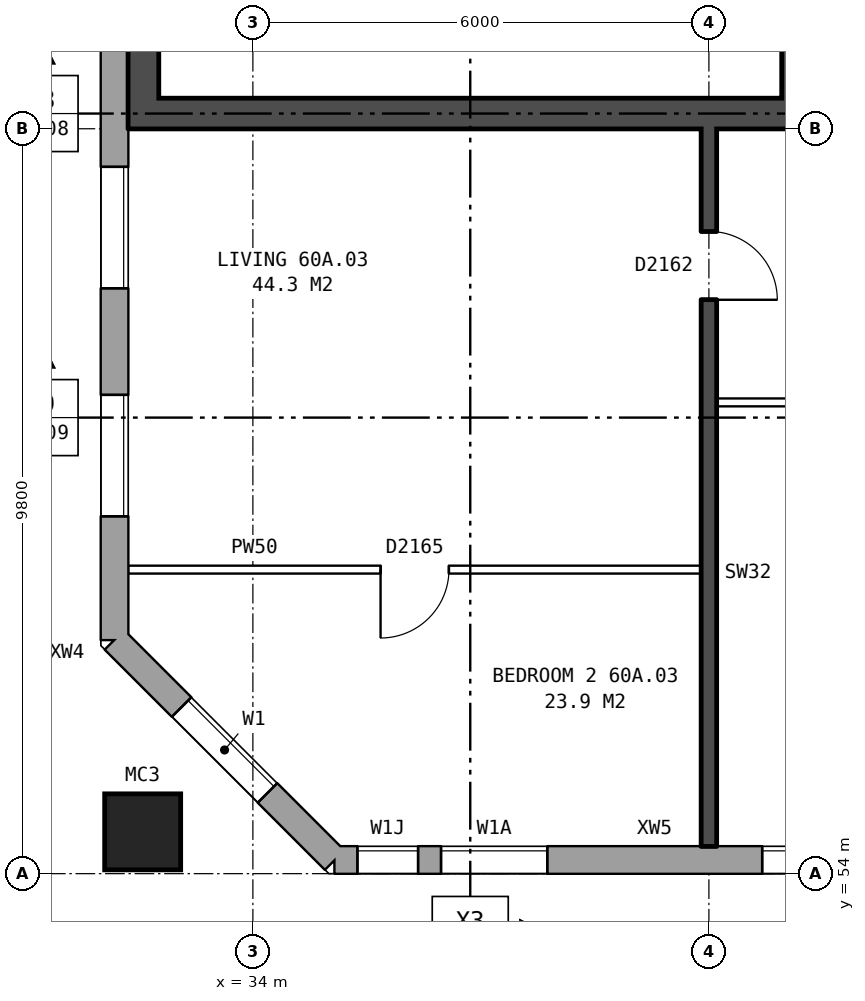
"""IFC4 building model, lengths in metres.
Left out: names, types, materials, properties, quantities, classifications, styles, units other than length and angle.
Written with IfcOpenShell. Run it as: python <this file> out.ifc"""

import sys

from ifc_helpers import new_model, si_unit, direction, frame, frame_2d, origin, origin_2d, place, context, subcontext, project, spatial, rectangle, hollow_rectangle, extrude, element, fill, save


model = new_model("IFC4")
c1 = context("Model", 3, precision=1e-05, world=origin(), true_north=direction((0.0, 1.0)))
c2 = subcontext(c1, "Body", "Model", "MODEL_VIEW")
j1 = project(units=[si_unit("LENGTHUNIT", "METRE"), si_unit("PLANEANGLEUNIT", "RADIAN")], contexts=[c1])
p1 = place(None, origin())
s1 = spatial("IfcSite", under=j1, at=p1, CompositionType="ELEMENT")
p2 = place(p1, origin())
s2 = spatial("IfcBuilding", under=s1, at=p2, CompositionType="ELEMENT")
p3 = place(p2, frame((0.0, 0.0, 212.1)))
s3 = spatial("IfcBuildingStorey", under=s2, at=p3, CompositionType="ELEMENT", Elevation=212.1)
p4 = place(p3, frame((32.55, 54.55, 0.0), z_axis=(0.0, 0.0, 1.0), x_axis=(1.0, 0.0, 0.0)))
e1 = element("IfcColumn", 1, at=p4, inside=s3, PredefinedType="COLUMN", context=c2, shape_type="SweptSolid", body=[
    extrude(hollow_rectangle(XDim=1.0, YDim=1.0, WallThickness=0.055, at=origin_2d()), origin(), (0.0, 0.0, 1.0), 3.1),
])
p5 = place(p3, frame((32.18, 57.075, 0.0), z_axis=(0.0, 0.0, 1.0), x_axis=(0.707106781187, -0.707106781187, 0.0)))
e2 = element("IfcWall", 2, at=p5, inside=s3, PredefinedType="STANDARD", context=c2, shape_type="SweptSolid", body=[
    extrude(rectangle(XDim=4.094, YDim=0.36, at=frame_2d((2.047, 0.0))), origin(), (0.0, 0.0, 1.0), 2.85),
])
p6 = place(p5, frame((1.247, 0.0, 0.8)))
e3 = element("IfcOpeningElement", 3, at=p6, cuts=e2, PredefinedType="OPENING", context=c2, shape_type="SweptSolid", body=[
    extrude(rectangle(XDim=1.6, YDim=1.8, at=frame_2d((0.8, 0.9))), frame((0.0, 0.19, 0.0), z_axis=(0.0, -1.0, 0.0), x_axis=(1.0, 0.0, 0.0)), (0.0, 0.0, 1.0), 0.38),
])
p7 = place(p3, frame((35.075, 54.18, 0.0), z_axis=(0.0, 0.0, 1.0), x_axis=(1.0, 0.0, 0.0)))
e4 = element("IfcWall", 4, at=p7, inside=s3, PredefinedType="STANDARD", context=c2, shape_type="SweptSolid", body=[
    extrude(rectangle(XDim=39.875, YDim=0.36, at=frame_2d((19.938, 0.0))), origin(), (0.0, 0.0, 1.0), 2.85),
])
p8 = place(p7, frame((0.3, 0.0, 0.8)))
e5 = element("IfcOpeningElement", 5, at=p8, cuts=e4, PredefinedType="OPENING", context=c2, shape_type="SweptSolid", body=[
    extrude(rectangle(XDim=0.8, YDim=1.5, at=frame_2d((0.4, 0.75))), frame((0.0, 0.19, 0.0), z_axis=(0.0, -1.0, 0.0), x_axis=(1.0, 0.0, 0.0)), (0.0, 0.0, 1.0), 0.38),
])
p9 = place(p7, frame((5.625, 0.0, 0.8)))
e6 = element("IfcOpeningElement", 6, at=p9, cuts=e4, PredefinedType="OPENING", context=c2, shape_type="SweptSolid", body=[
    extrude(rectangle(XDim=1.6, YDim=1.8, at=frame_2d((0.8, 0.9))), frame((0.0, 0.19, 0.0), z_axis=(0.0, -1.0, 0.0), x_axis=(1.0, 0.0, 0.0)), (0.0, 0.0, 1.0), 0.38),
])
p10 = place(p7, frame((8.625, 0.0, 0.8)))
e7 = element("IfcOpeningElement", 7, at=p10, cuts=e4, PredefinedType="OPENING", context=c2, shape_type="SweptSolid", body=[
    extrude(rectangle(XDim=1.6, YDim=1.8, at=frame_2d((0.8, 0.9))), frame((0.0, 0.19, 0.0), z_axis=(0.0, -1.0, 0.0), x_axis=(1.0, 0.0, 0.0)), (0.0, 0.0, 1.0), 0.38),
])
p11 = place(p7, frame((11.625, 0.0, 0.8)))
e8 = element("IfcOpeningElement", 8, at=p11, cuts=e4, PredefinedType="OPENING", context=c2, shape_type="SweptSolid", body=[
    extrude(rectangle(XDim=1.6, YDim=1.8, at=frame_2d((0.8, 0.9))), frame((0.0, 0.19, 0.0), z_axis=(0.0, -1.0, 0.0), x_axis=(1.0, 0.0, 0.0)), (0.0, 0.0, 1.0), 0.38),
])
p12 = place(p7, frame((14.625, 0.0, 0.8)))
e9 = element("IfcOpeningElement", 9, at=p12, cuts=e4, PredefinedType="OPENING", context=c2, shape_type="SweptSolid", body=[
    extrude(rectangle(XDim=1.6, YDim=1.8, at=frame_2d((0.8, 0.9))), frame((0.0, 0.19, 0.0), z_axis=(0.0, -1.0, 0.0), x_axis=(1.0, 0.0, 0.0)), (0.0, 0.0, 1.0), 0.38),
])
p13 = place(p7, frame((17.625, 0.0, 0.8)))
e10 = element("IfcOpeningElement", 10, at=p13, cuts=e4, PredefinedType="OPENING", context=c2, shape_type="SweptSolid", body=[
    extrude(rectangle(XDim=1.6, YDim=1.8, at=frame_2d((0.8, 0.9))), frame((0.0, 0.19, 0.0), z_axis=(0.0, -1.0, 0.0), x_axis=(1.0, 0.0, 0.0)), (0.0, 0.0, 1.0), 0.38),
])
p14 = place(p7, frame((20.625, 0.0, 0.8)))
e11 = element("IfcOpeningElement", 11, at=p14, cuts=e4, PredefinedType="OPENING", context=c2, shape_type="SweptSolid", body=[
    extrude(rectangle(XDim=1.6, YDim=1.8, at=frame_2d((0.8, 0.9))), frame((0.0, 0.19, 0.0), z_axis=(0.0, -1.0, 0.0), x_axis=(1.0, 0.0, 0.0)), (0.0, 0.0, 1.0), 0.38),
])
p15 = place(p7, frame((23.625, 0.0, 0.8)))
e12 = element("IfcOpeningElement", 12, at=p15, cuts=e4, PredefinedType="OPENING", context=c2, shape_type="SweptSolid", body=[
    extrude(rectangle(XDim=1.6, YDim=1.8, at=frame_2d((0.8, 0.9))), frame((0.0, 0.19, 0.0), z_axis=(0.0, -1.0, 0.0), x_axis=(1.0, 0.0, 0.0)), (0.0, 0.0, 1.0), 0.38),
])
p16 = place(p7, frame((26.625, 0.0, 0.8)))
e13 = element("IfcOpeningElement", 13, at=p16, cuts=e4, PredefinedType="OPENING", context=c2, shape_type="SweptSolid", body=[
    extrude(rectangle(XDim=1.6, YDim=1.8, at=frame_2d((0.8, 0.9))), frame((0.0, 0.19, 0.0), z_axis=(0.0, -1.0, 0.0), x_axis=(1.0, 0.0, 0.0)), (0.0, 0.0, 1.0), 0.38),
])
p17 = place(p7, frame((29.625, 0.0, 0.8)))
e14 = element("IfcOpeningElement", 14, at=p17, cuts=e4, PredefinedType="OPENING", context=c2, shape_type="SweptSolid", body=[
    extrude(rectangle(XDim=1.6, YDim=1.8, at=frame_2d((0.8, 0.9))), frame((0.0, 0.19, 0.0), z_axis=(0.0, -1.0, 0.0), x_axis=(1.0, 0.0, 0.0)), (0.0, 0.0, 1.0), 0.38),
])
p18 = place(p7, frame((31.525, 0.0, 0.8)))
e15 = element("IfcOpeningElement", 15, at=p18, cuts=e4, PredefinedType="OPENING", context=c2, shape_type="SweptSolid", body=[
    extrude(rectangle(XDim=0.8, YDim=1.5, at=frame_2d((0.4, 0.75))), frame((0.0, 0.19, 0.0), z_axis=(0.0, -1.0, 0.0), x_axis=(1.0, 0.0, 0.0)), (0.0, 0.0, 1.0), 0.38),
])
p19 = place(p7, frame((35.625, 0.0, 0.8)))
e16 = element("IfcOpeningElement", 16, at=p19, cuts=e4, PredefinedType="OPENING", context=c2, shape_type="SweptSolid", body=[
    extrude(rectangle(XDim=1.6, YDim=1.8, at=frame_2d((0.8, 0.9))), frame((0.0, 0.19, 0.0), z_axis=(0.0, -1.0, 0.0), x_axis=(1.0, 0.0, 0.0)), (0.0, 0.0, 1.0), 0.38),
])
p20 = place(p7, frame((1.4, 0.0, 0.8)))
e17 = element("IfcOpeningElement", 17, at=p20, cuts=e4, PredefinedType="OPENING", context=c2, shape_type="SweptSolid", body=[
    extrude(rectangle(XDim=1.4, YDim=1.8, at=frame_2d((0.7, 0.9))), frame((0.0, 0.19, 0.0), z_axis=(0.0, -1.0, 0.0), x_axis=(1.0, 0.0, 0.0)), (0.0, 0.0, 1.0), 0.38),
])
p21 = place(p7, frame((33.975, 0.0, 1.7)))
e18 = element("IfcOpeningElement", 18, at=p21, cuts=e4, PredefinedType="OPENING", context=c2, shape_type="SweptSolid", body=[
    extrude(rectangle(XDim=0.6, YDim=0.9, at=frame_2d((0.3, 0.45))), frame((0.0, 0.19, 0.0), z_axis=(0.0, -1.0, 0.0), x_axis=(1.0, 0.0, 0.0)), (0.0, 0.0, 1.0), 0.38),
])
p22 = place(p3, frame((32.18, 82.925, 0.0), z_axis=(0.0, 0.0, 1.0), x_axis=(0.0, -1.0, 0.0)))
e19 = element("IfcWall", 19, at=p22, inside=s3, PredefinedType="STANDARD", context=c2, shape_type="SweptSolid", body=[
    extrude(rectangle(XDim=25.851, YDim=0.36, at=frame_2d((12.925, 0.0))), origin(), (0.0, 0.0, 1.0), 2.85),
])
p23 = place(p22, frame((1.625, 0.0, 0.8)))
e20 = element("IfcOpeningElement", 20, at=p23, cuts=e19, PredefinedType="OPENING", context=c2, shape_type="SweptSolid", body=[
    extrude(rectangle(XDim=1.6, YDim=1.8, at=frame_2d((0.8, 0.9))), frame((0.0, 0.19, 0.0), z_axis=(0.0, -1.0, 0.0), x_axis=(1.0, 0.0, 0.0)), (0.0, 0.0, 1.0), 0.38),
])
p24 = place(p22, frame((4.625, 0.0, 0.8)))
e21 = element("IfcOpeningElement", 21, at=p24, cuts=e19, PredefinedType="OPENING", context=c2, shape_type="SweptSolid", body=[
    extrude(rectangle(XDim=1.6, YDim=1.8, at=frame_2d((0.8, 0.9))), frame((0.0, 0.19, 0.0), z_axis=(0.0, -1.0, 0.0), x_axis=(1.0, 0.0, 0.0)), (0.0, 0.0, 1.0), 0.38),
])
p25 = place(p22, frame((19.625, 0.0, 0.8)))
e22 = element("IfcOpeningElement", 22, at=p25, cuts=e19, PredefinedType="OPENING", context=c2, shape_type="SweptSolid", body=[
    extrude(rectangle(XDim=1.6, YDim=1.8, at=frame_2d((0.8, 0.9))), frame((0.0, 0.19, 0.0), z_axis=(0.0, -1.0, 0.0), x_axis=(1.0, 0.0, 0.0)), (0.0, 0.0, 1.0), 0.38),
])
p26 = place(p22, frame((22.625, 0.0, 0.8)))
e23 = element("IfcOpeningElement", 23, at=p26, cuts=e19, PredefinedType="OPENING", context=c2, shape_type="SweptSolid", body=[
    extrude(rectangle(XDim=1.6, YDim=1.8, at=frame_2d((0.8, 0.9))), frame((0.0, 0.19, 0.0), z_axis=(0.0, -1.0, 0.0), x_axis=(1.0, 0.0, 0.0)), (0.0, 0.0, 1.0), 0.38),
])
p27 = place(p3, frame((41.16, 76.2, 0.0), z_axis=(0.0, 0.0, 1.0), x_axis=(0.0, -1.0, 0.0)))
e24 = element("IfcWall", 24, at=p27, inside=s3, PredefinedType="SHEAR", context=c2, shape_type="SweptSolid", body=[
    extrude(rectangle(XDim=12.4, YDim=0.4, at=frame_2d((6.2, 0.0))), origin(), (0.0, 0.0, 1.0), 2.85),
])
p28 = place(p27, frame((1.325, 0.0, 0.0)))
e25 = element("IfcOpeningElement", 25, at=p28, cuts=e24, PredefinedType="OPENING", context=c2, shape_type="SweptSolid", body=[
    extrude(rectangle(XDim=1.1, YDim=2.1, at=frame_2d((0.55, 1.05))), frame((0.0, 0.21, 0.0), z_axis=(0.0, -1.0, 0.0), x_axis=(1.0, 0.0, 0.0)), (0.0, 0.0, 1.0), 0.42),
])
p29 = place(p27, frame((4.575, 0.0, 0.0)))
e26 = element("IfcOpeningElement", 26, at=p29, cuts=e24, PredefinedType="OPENING", context=c2, shape_type="SweptSolid", body=[
    extrude(rectangle(XDim=0.85, YDim=2.1, at=frame_2d((0.425, 1.05))), frame((0.0, 0.21, 0.0), z_axis=(0.0, -1.0, 0.0), x_axis=(1.0, 0.0, 0.0)), (0.0, 0.0, 1.0), 0.42),
])
p30 = place(p27, frame((7.825, 0.0, 0.0)))
e27 = element("IfcOpeningElement", 27, at=p30, cuts=e24, PredefinedType="OPENING", context=c2, shape_type="SweptSolid", body=[
    extrude(rectangle(XDim=0.85, YDim=2.1, at=frame_2d((0.425, 1.05))), frame((0.0, 0.21, 0.0), z_axis=(0.0, -1.0, 0.0), x_axis=(1.0, 0.0, 0.0)), (0.0, 0.0, 1.0), 0.42),
])
p31 = place(p27, frame((9.9, 0.0, 0.0)))
e28 = element("IfcOpeningElement", 28, at=p31, cuts=e24, PredefinedType="OPENING", context=c2, shape_type="SweptSolid", body=[
    extrude(rectangle(XDim=1.1, YDim=2.1, at=frame_2d((0.55, 1.05))), frame((0.0, 0.21, 0.0), z_axis=(0.0, -1.0, 0.0), x_axis=(1.0, 0.0, 0.0)), (0.0, 0.0, 1.0), 0.42),
])
p32 = place(p3, frame((32.56, 76.2, 0.0), z_axis=(0.0, 0.0, 1.0), x_axis=(0.0, -1.0, 0.0)))
e29 = element("IfcWall", 29, at=p32, inside=s3, PredefinedType="SHEAR", context=c2, shape_type="SweptSolid", body=[
    extrude(rectangle(XDim=12.4, YDim=0.4, at=frame_2d((6.2, 0.0))), origin(), (0.0, 0.0, 1.0), 2.85),
])
p33 = place(p3, frame((40.96, 64.0, 0.0), z_axis=(0.0, 0.0, 1.0), x_axis=(-1.0, 0.0, 0.0)))
e30 = element("IfcWall", 30, at=p33, inside=s3, PredefinedType="SHEAR", context=c2, shape_type="SweptSolid", body=[
    extrude(rectangle(XDim=8.2, YDim=0.4, at=frame_2d((4.1, 0.0))), origin(), (0.0, 0.0, 1.0), 2.85),
])
p34 = place(p3, frame((32.36, 58.0, 0.0), z_axis=(0.0, 0.0, 1.0), x_axis=(1.0, 0.0, 0.0)))
e31 = element("IfcWall", 31, at=p34, inside=s3, PredefinedType="PARTITIONING", context=c2, shape_type="SweptSolid", body=[
    extrude(rectangle(XDim=7.54, YDim=0.1, at=frame_2d((3.77, 0.0))), origin(), (0.0, 0.0, 1.0), 2.85),
])
p35 = place(p34, frame((3.32, 0.0, 0.0)))
e32 = element("IfcOpeningElement", 32, at=p35, cuts=e31, PredefinedType="OPENING", context=c2, shape_type="SweptSolid", body=[
    extrude(rectangle(XDim=0.9, YDim=2.1, at=frame_2d((0.45, 1.05))), frame((0.0, 0.06, 0.0), z_axis=(0.0, -1.0, 0.0), x_axis=(1.0, 0.0, 0.0)), (0.0, 0.0, 1.0), 0.12),
])
p36 = place(p3, frame((40.1, 60.2, 0.0), z_axis=(0.0, 0.0, 1.0), x_axis=(1.0, 0.0, 0.0)))
e33 = element("IfcWall", 33, at=p36, inside=s3, PredefinedType="PARTITIONING", context=c2, shape_type="SweptSolid", body=[
    extrude(rectangle(XDim=5.8, YDim=0.1, at=frame_2d((2.9, 0.0))), origin(), (0.0, 0.0, 1.0), 2.85),
])
p37 = place(p36, frame((1.3, 0.0, 0.0)))
e34 = element("IfcOpeningElement", 34, at=p37, cuts=e33, PredefinedType="OPENING", context=c2, shape_type="SweptSolid", body=[
    extrude(rectangle(XDim=0.9, YDim=2.1, at=frame_2d((0.45, 1.05))), frame((0.0, 0.06, 0.0), z_axis=(0.0, -1.0, 0.0), x_axis=(1.0, 0.0, 0.0)), (0.0, 0.0, 1.0), 0.12),
])
p38 = place(p36, frame((4.2, 0.0, 0.0)))
e35 = element("IfcOpeningElement", 35, at=p38, cuts=e33, PredefinedType="OPENING", context=c2, shape_type="SweptSolid", body=[
    extrude(rectangle(XDim=0.9, YDim=2.1, at=frame_2d((0.45, 1.05))), frame((0.0, 0.06, 0.0), z_axis=(0.0, -1.0, 0.0), x_axis=(1.0, 0.0, 0.0)), (0.0, 0.0, 1.0), 0.12),
])
p39 = place(p3, frame((40.0, 54.36, 0.0), z_axis=(0.0, 0.0, 1.0), x_axis=(0.0, 1.0, 0.0)))
e36 = element("IfcWall", 36, at=p39, inside=s3, PredefinedType="SOLIDWALL", context=c2, shape_type="SweptSolid", body=[
    extrude(rectangle(XDim=9.44, YDim=0.2, at=frame_2d((4.72, 0.0))), origin(), (0.0, 0.0, 1.0), 2.85),
])
p40 = place(p39, frame((7.19, 0.0, 0.0)))
e37 = element("IfcOpeningElement", 37, at=p40, cuts=e36, PredefinedType="OPENING", context=c2, shape_type="SweptSolid", body=[
    extrude(rectangle(XDim=0.9, YDim=2.1, at=frame_2d((0.45, 1.05))), frame((0.0, 0.11, 0.0), z_axis=(0.0, -1.0, 0.0), x_axis=(1.0, 0.0, 0.0)), (0.0, 0.0, 1.0), 0.22),
])
p41 = place(p6, origin())
e38 = element("IfcWindow", 38, at=p41, inside=s3, PartitioningType="SINGLE_PANEL", PredefinedType="WINDOW", context=c2, shape_type="SweptSolid", body=[
    extrude(rectangle(XDim=1.6, YDim=1.8, at=frame_2d((0.8, 0.9))), frame((0.0, 0.15, 0.0), z_axis=(0.0, -1.0, 0.0), x_axis=(1.0, 0.0, 0.0)), (0.0, 0.0, 1.0), 0.06),
])
fill(e3, e38)
p42 = place(p8, origin())
e39 = element("IfcWindow", 39, at=p42, inside=s3, PartitioningType="SINGLE_PANEL", PredefinedType="WINDOW", context=c2, shape_type="SweptSolid", body=[
    extrude(rectangle(XDim=0.8, YDim=1.5, at=frame_2d((0.4, 0.75))), frame((0.0, 0.15, 0.0), z_axis=(0.0, -1.0, 0.0), x_axis=(1.0, 0.0, 0.0)), (0.0, 0.0, 1.0), 0.06),
])
fill(e5, e39)
p43 = place(p9, origin())
e40 = element("IfcWindow", 40, at=p43, inside=s3, PartitioningType="SINGLE_PANEL", PredefinedType="WINDOW", context=c2, shape_type="SweptSolid", body=[
    extrude(rectangle(XDim=1.6, YDim=1.8, at=frame_2d((0.8, 0.9))), frame((0.0, 0.15, 0.0), z_axis=(0.0, -1.0, 0.0), x_axis=(1.0, 0.0, 0.0)), (0.0, 0.0, 1.0), 0.06),
])
fill(e6, e40)
p44 = place(p25, origin())
e41 = element("IfcWindow", 41, at=p44, inside=s3, PartitioningType="SINGLE_PANEL", PredefinedType="WINDOW", context=c2, shape_type="SweptSolid", body=[
    extrude(rectangle(XDim=1.6, YDim=1.8, at=frame_2d((0.8, 0.9))), frame((0.0, 0.15, 0.0), z_axis=(0.0, -1.0, 0.0), x_axis=(1.0, 0.0, 0.0)), (0.0, 0.0, 1.0), 0.06),
])
fill(e22, e41)
p45 = place(p26, origin())
e42 = element("IfcWindow", 42, at=p45, inside=s3, PartitioningType="SINGLE_PANEL", PredefinedType="WINDOW", context=c2, shape_type="SweptSolid", body=[
    extrude(rectangle(XDim=1.6, YDim=1.8, at=frame_2d((0.8, 0.9))), frame((0.0, 0.15, 0.0), z_axis=(0.0, -1.0, 0.0), x_axis=(1.0, 0.0, 0.0)), (0.0, 0.0, 1.0), 0.06),
])
fill(e23, e42)
p46 = place(p35, frame((0.9, 0.0, 0.0), z_axis=(0.0, 0.0, 1.0), x_axis=(-1.0, 0.0, 0.0)))
e43 = element("IfcDoor", 43, at=p46, inside=s3, OperationType="SINGLE_SWING_RIGHT", PredefinedType="DOOR", context=c2, shape_type="SweptSolid", body=[
    extrude(rectangle(XDim=0.9, YDim=2.1, at=frame_2d((0.45, 1.05))), frame((0.0, 0.025, 0.0), z_axis=(0.0, -1.0, 0.0), x_axis=(1.0, 0.0, 0.0)), (0.0, 0.0, 1.0), 0.05),
])
fill(e32, e43)
p47 = place(p40, frame((0.9, 0.0, 0.0), z_axis=(0.0, 0.0, 1.0), x_axis=(-1.0, 0.0, 0.0)))
e44 = element("IfcDoor", 44, at=p47, inside=s3, OperationType="SINGLE_SWING_RIGHT", PredefinedType="DOOR", context=c2, shape_type="SweptSolid", body=[
    extrude(rectangle(XDim=0.9, YDim=2.1, at=frame_2d((0.45, 1.05))), frame((0.0, 0.025, 0.0), z_axis=(0.0, -1.0, 0.0), x_axis=(1.0, 0.0, 0.0)), (0.0, 0.0, 1.0), 0.05),
])
fill(e37, e44)
p48 = place(p20, origin())
e45 = element("IfcWindow", 45, at=p48, inside=s3, PartitioningType="SINGLE_PANEL", PredefinedType="WINDOW", context=c2, shape_type="SweptSolid", body=[
    extrude(rectangle(XDim=1.4, YDim=1.8, at=frame_2d((0.7, 0.9))), frame((0.0, 0.15, 0.0), z_axis=(0.0, -1.0, 0.0), x_axis=(1.0, 0.0, 0.0)), (0.0, 0.0, 1.0), 0.06),
])
fill(e17, e45)
save(model, sys.argv[1])
